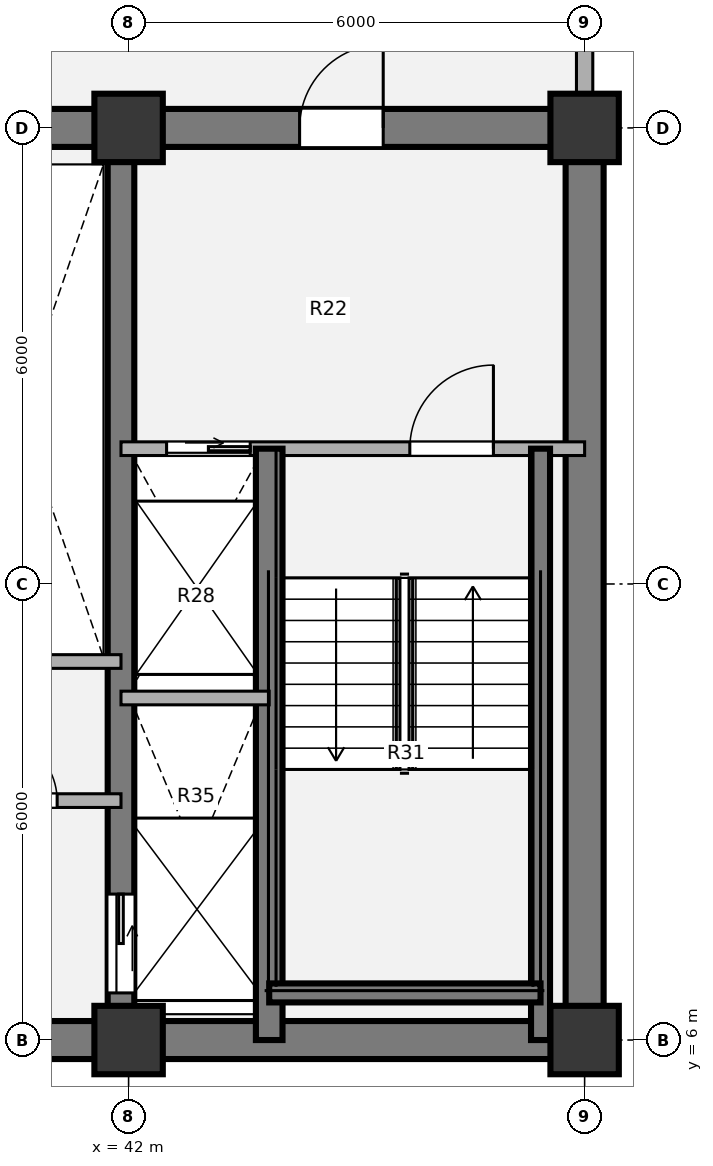
"""IFC4 building model, lengths in metres.
Left out: names, types, materials, properties, quantities, classifications, styles, units other than length and angle.
Written with IfcOpenShell. Run it as: python <this file> out.ifc"""

import sys

from ifc_helpers import new_model, si_unit, direction, frame, frame_2d, origin, origin_2d, place, context, subcontext, project, spatial, rectangle, extrude, source, transform, mapped, element, fill, save


model = new_model("IFC4")
c1 = context("Model", 3, precision=1e-05, world=origin(), true_north=direction((0.0, 1.0)))
c2 = subcontext(c1, "Body", "Model", "MODEL_VIEW")
j1 = project(units=[si_unit("LENGTHUNIT", "METRE"), si_unit("PLANEANGLEUNIT", "RADIAN")], contexts=[c1])
p1 = place(None, origin())
s1 = spatial("IfcSite", under=j1, at=p1, CompositionType="ELEMENT")
p2 = place(p1, origin())
s2 = spatial("IfcBuilding", under=s1, at=p2, CompositionType="ELEMENT")
p3 = place(p2, frame((0.0, 0.0, 138.96)))
s3 = spatial("IfcBuildingStorey", under=s2, at=p3, CompositionType="ELEMENT", Elevation=138.96)
m1 = source(origin(), c2, "Body", "SweptSolid", [
    extrude(rectangle(XDim=0.9, YDim=0.9, at=origin_2d()), origin(), (0.0, 0.0, 1.0), 3.78),
])
for number, where, z_axis, x_axis in (
    (1, (42.0, 6.0, 0.0), (0.0, 0.0, 1.0), (1.0, 0.0, 0.0)),
    (2, (48.0, 6.0, 0.0), (0.0, 0.0, 1.0), (1.0, 0.0, 0.0)),
    (3, (42.0, 18.0, 0.0), (0.0, 0.0, 1.0), (1.0, 0.0, 0.0)),
    (4, (48.0, 18.0, 0.0), (0.0, 0.0, 1.0), (1.0, 0.0, 0.0)),
):
    element("IfcColumn", number, at=place(p3, frame(where, z_axis=z_axis, x_axis=x_axis)), inside=s3, PredefinedType="COLUMN", context=c2, shape_type="MappedRepresentation", body=[
        mapped(m1, transform((0.0, 0.0, 0.0), x_axis=(1.0, 0.0, 0.0), y_axis=(0.0, 1.0, 0.0), z_axis=(0.0, 0.0, 1.0), scale=1.0)),
    ])
p4 = place(p3, frame((48.25, 6.0, 0.0), z_axis=(0.0, 0.0, 1.0), x_axis=(-1.0, 0.0, 0.0)))
e5 = element("IfcWall", 5, at=p4, inside=s3, PredefinedType="SHEAR", context=c2, shape_type="SweptSolid", body=[
    extrude(rectangle(XDim=24.5, YDim=0.5, at=frame_2d((12.25, 0.0))), origin(), (0.0, 0.0, 1.0), 3.78),
])
p5 = place(p3, frame((48.0, 18.0, 0.0), z_axis=(0.0, 0.0, 1.0), x_axis=(0.0, -1.0, 0.0)))
e6 = element("IfcWall", 6, at=p5, inside=s3, PredefinedType="SHEAR", context=c2, shape_type="SweptSolid", body=[
    extrude(rectangle(XDim=12.0, YDim=0.5, at=frame_2d((6.0, 0.0))), origin(), (0.0, 0.0, 1.0), 3.78),
])
p6 = place(p3, frame((38.8, 18.0, 0.0), z_axis=(0.0, 0.0, 1.0), x_axis=(1.0, 0.0, 0.0)))
e7 = element("IfcWall", 7, at=p6, inside=s3, PredefinedType="SHEAR", context=c2, shape_type="SweptSolid", body=[
    extrude(rectangle(XDim=9.45, YDim=0.5, at=frame_2d((4.725, 0.0))), origin(), (0.0, 0.0, 1.0), 3.78),
])
p7 = place(p6, frame((5.45, 0.0, 0.0)))
e8 = element("IfcOpeningElement", 8, at=p7, cuts=e7, PredefinedType="OPENING", context=c2, shape_type="SweptSolid", body=[
    extrude(rectangle(XDim=1.1, YDim=2.1, at=origin_2d()), frame((0.55, 0.26, 1.05), z_axis=(0.0, -1.0, 0.0), x_axis=(1.0, 0.0, 0.0)), (0.0, 0.0, 1.0), 0.52),
])
p8 = place(p3, frame((41.9, 18.0, 0.0), z_axis=(0.0, 0.0, 1.0), x_axis=(0.0, -1.0, 0.0)))
e9 = element("IfcWall", 9, at=p8, inside=s3, PredefinedType="SHEAR", context=c2, shape_type="SweptSolid", body=[
    extrude(rectangle(XDim=12.0, YDim=0.35, at=frame_2d((6.0, 0.0))), origin(), (0.0, 0.0, 1.0), 3.78),
])
p9 = place(p8, frame((10.08, 0.0, 0.0)))
e10 = element("IfcOpeningElement", 10, at=p9, cuts=e9, PredefinedType="OPENING", context=c2, shape_type="SweptSolid", body=[
    extrude(rectangle(XDim=1.3, YDim=2.1, at=origin_2d()), frame((0.65, 0.185, 1.05), z_axis=(0.0, -1.0, 0.0), x_axis=(1.0, 0.0, 0.0)), (0.0, 0.0, 1.0), 0.37),
])
p10 = place(p3, frame((48.0, 21.05, 0.0), z_axis=(0.0, 0.0, 1.0), x_axis=(0.0, -1.0, 0.0)))
e11 = element("IfcWall", 11, at=p10, inside=s3, PredefinedType="SOLIDWALL", context=c2, shape_type="SweptSolid", body=[
    extrude(rectangle(XDim=2.62, YDim=0.215, at=frame_2d((1.31, 0.0))), origin(), (0.0, 0.0, 1.0), 3.53),
])
p11 = place(p3, frame((39.35, 10.98, 0.0), z_axis=(0.0, 0.0, 1.0), x_axis=(1.0, 0.0, 0.0)))
e12 = element("IfcWall", 12, at=p11, inside=s3, PredefinedType="PARTITIONING", context=c2, shape_type="SweptSolid", body=[
    extrude(rectangle(XDim=2.55, YDim=0.18, at=frame_2d((1.275, 0.0))), origin(), (0.0, 0.0, 1.0), 3.5),
])
p12 = place(p3, frame((39.35, 9.15, 0.0), z_axis=(0.0, 0.0, 1.0), x_axis=(1.0, 0.0, 0.0)))
e13 = element("IfcWall", 13, at=p12, inside=s3, PredefinedType="PARTITIONING", context=c2, shape_type="SweptSolid", body=[
    extrude(rectangle(XDim=2.55, YDim=0.18, at=frame_2d((1.275, 0.0))), origin(), (0.0, 0.0, 1.0), 3.5),
])
p13 = place(p12, frame((0.85, 0.0, 0.0)))
e14 = element("IfcOpeningElement", 14, at=p13, cuts=e13, PredefinedType="OPENING", context=c2, shape_type="SweptSolid", body=[
    extrude(rectangle(XDim=0.86, YDim=2.1, at=origin_2d()), frame((0.43, 0.1, 1.05), z_axis=(0.0, -1.0, 0.0), x_axis=(1.0, 0.0, 0.0)), (0.0, 0.0, 1.0), 0.2),
])
p14 = place(p3, frame((41.9, 13.78, 0.0), z_axis=(0.0, 0.0, 1.0), x_axis=(1.0, 0.0, 0.0)))
e15 = element("IfcWall", 15, at=p14, inside=s3, PredefinedType="PARTITIONING", context=c2, shape_type="SweptSolid", body=[
    extrude(rectangle(XDim=6.1, YDim=0.18, at=frame_2d((3.05, 0.0))), origin(), (0.0, 0.0, 1.0), 3.5),
])
p15 = place(p14, frame((0.6, 0.0, 0.0)))
e16 = element("IfcOpeningElement", 16, at=p15, cuts=e15, PredefinedType="OPENING", context=c2, shape_type="SweptSolid", body=[
    extrude(rectangle(XDim=1.1, YDim=2.1, at=origin_2d()), frame((0.55, 0.1, 1.05), z_axis=(0.0, -1.0, 0.0), x_axis=(1.0, 0.0, 0.0)), (0.0, 0.0, 1.0), 0.2),
])
p16 = place(p14, frame((3.8, 0.0, 0.0)))
e17 = element("IfcOpeningElement", 17, at=p16, cuts=e15, PredefinedType="OPENING", context=c2, shape_type="SweptSolid", body=[
    extrude(rectangle(XDim=1.1, YDim=2.1, at=origin_2d()), frame((0.55, 0.1, 1.05), z_axis=(0.0, -1.0, 0.0), x_axis=(1.0, 0.0, 0.0)), (0.0, 0.0, 1.0), 0.2),
])
p17 = place(p3, frame((43.85, 6.0, 0.0), z_axis=(0.0, 0.0, 1.0), x_axis=(0.0, 1.0, 0.0)))
e18 = element("IfcWall", 18, at=p17, inside=s3, PredefinedType="SHEAR", context=c2, shape_type="SweptSolid", body=[
    extrude(rectangle(XDim=7.78, YDim=0.35, at=frame_2d((3.89, 0.0))), origin(), (0.0, 0.0, 1.0), 3.85),
])
p18 = place(p3, frame((47.42, 6.0, 0.0), z_axis=(0.0, 0.0, 1.0), x_axis=(0.0, 1.0, 0.0)))
e19 = element("IfcWall", 19, at=p18, inside=s3, PredefinedType="SHEAR", context=c2, shape_type="SweptSolid", body=[
    extrude(rectangle(XDim=7.78, YDim=0.25, at=frame_2d((3.89, 0.0))), origin(), (0.0, 0.0, 1.0), 3.85),
])
p19 = place(p3, frame((43.85, 6.62, 0.0), z_axis=(0.0, 0.0, 1.0), x_axis=(1.0, 0.0, 0.0)))
e20 = element("IfcWall", 20, at=p19, inside=s3, PredefinedType="SHEAR", context=c2, shape_type="SweptSolid", body=[
    extrude(rectangle(XDim=3.57, YDim=0.25, at=frame_2d((1.785, 0.0))), origin(), (0.0, 0.0, 1.0), 3.85),
])
p20 = place(p3, frame((41.9, 10.5, 0.0), z_axis=(0.0, 0.0, 1.0), x_axis=(1.0, 0.0, 0.0)))
e21 = element("IfcWall", 21, at=p20, inside=s3, PredefinedType="PARTITIONING", context=c2, shape_type="SweptSolid", body=[
    extrude(rectangle(XDim=1.95, YDim=0.18, at=frame_2d((0.975, 0.0))), origin(), (0.0, 0.0, 1.0), 3.5),
])
m2 = source(origin(), c2, "Body", "SweptSolid", [
    extrude(rectangle(XDim=0.86, YDim=2.1, at=origin_2d()), frame((0.43, 0.025, 1.05), z_axis=(0.0, -1.0, 0.0), x_axis=(1.0, 0.0, 0.0)), (0.0, 0.0, 1.0), 0.05),
])
p21 = place(p13, origin())
e22 = element("IfcDoor", 22, at=p21, inside=s3, OperationType="SINGLE_SWING_LEFT", PredefinedType="DOOR", context=c2, shape_type="MappedRepresentation", body=[
    mapped(m2, transform((0.0, 0.0, 0.0), x_axis=(1.0, 0.0, 0.0), y_axis=(0.0, 1.0, 0.0), z_axis=(0.0, 0.0, 1.0), scale=1.0)),
])
fill(e14, e22)
m3 = source(origin(), c2, "Body", "SweptSolid", [
    extrude(rectangle(XDim=1.1, YDim=2.1, at=origin_2d()), frame((0.55, 0.025, 1.05), z_axis=(0.0, -1.0, 0.0), x_axis=(1.0, 0.0, 0.0)), (0.0, 0.0, 1.0), 0.05),
])
p22 = place(p15, origin())
e23 = element("IfcDoor", 23, at=p22, inside=s3, OperationType="SLIDING_TO_RIGHT", PredefinedType="DOOR", context=c2, shape_type="MappedRepresentation", body=[
    mapped(m3, transform((0.0, 0.0, 0.0), x_axis=(1.0, 0.0, 0.0), y_axis=(0.0, 1.0, 0.0), z_axis=(0.0, 0.0, 1.0), scale=1.0)),
])
fill(e16, e23)
m4 = source(origin(), c2, "Body", "SweptSolid", [
    extrude(rectangle(XDim=1.1, YDim=2.1, at=origin_2d()), frame((0.55, 0.025, 1.05), z_axis=(0.0, -1.0, 0.0), x_axis=(1.0, 0.0, 0.0)), (0.0, 0.0, 1.0), 0.05),
])
p23 = place(p16, origin())
e24 = element("IfcDoor", 24, at=p23, inside=s3, OperationType="SINGLE_SWING_RIGHT", PredefinedType="DOOR", context=c2, shape_type="MappedRepresentation", body=[
    mapped(m4, transform((0.0, 0.0, 0.0), x_axis=(1.0, 0.0, 0.0), y_axis=(0.0, 1.0, 0.0), z_axis=(0.0, 0.0, 1.0), scale=1.0)),
])
fill(e17, e24)
m5 = source(origin(), c2, "Body", "SweptSolid", [
    extrude(rectangle(XDim=1.3, YDim=2.1, at=origin_2d()), frame((0.65, 0.025, 1.05), z_axis=(0.0, -1.0, 0.0), x_axis=(1.0, 0.0, 0.0)), (0.0, 0.0, 1.0), 0.05),
])
p24 = place(p9, origin())
e25 = element("IfcDoor", 25, at=p24, inside=s3, OperationType="SLIDING_TO_LEFT", PredefinedType="DOOR", context=c2, shape_type="MappedRepresentation", body=[
    mapped(m5, transform((0.0, 0.0, 0.0), x_axis=(1.0, 0.0, 0.0), y_axis=(0.0, 1.0, 0.0), z_axis=(0.0, 0.0, 1.0), scale=1.0)),
])
fill(e10, e25)
m6 = source(origin(), c2, "Body", "SweptSolid", [
    extrude(rectangle(XDim=1.1, YDim=2.1, at=origin_2d()), frame((0.55, 0.025, 1.05), z_axis=(0.0, -1.0, 0.0), x_axis=(1.0, 0.0, 0.0)), (0.0, 0.0, 1.0), 0.05),
])
p25 = place(p7, origin())
e26 = element("IfcDoor", 26, at=p25, inside=s3, OperationType="SINGLE_SWING_RIGHT", PredefinedType="DOOR", context=c2, shape_type="MappedRepresentation", body=[
    mapped(m6, transform((0.0, 0.0, 0.0), x_axis=(1.0, 0.0, 0.0), y_axis=(0.0, 1.0, 0.0), z_axis=(0.0, 0.0, 1.0), scale=1.0)),
])
fill(e8, e26)
save(model, sys.argv[1])
